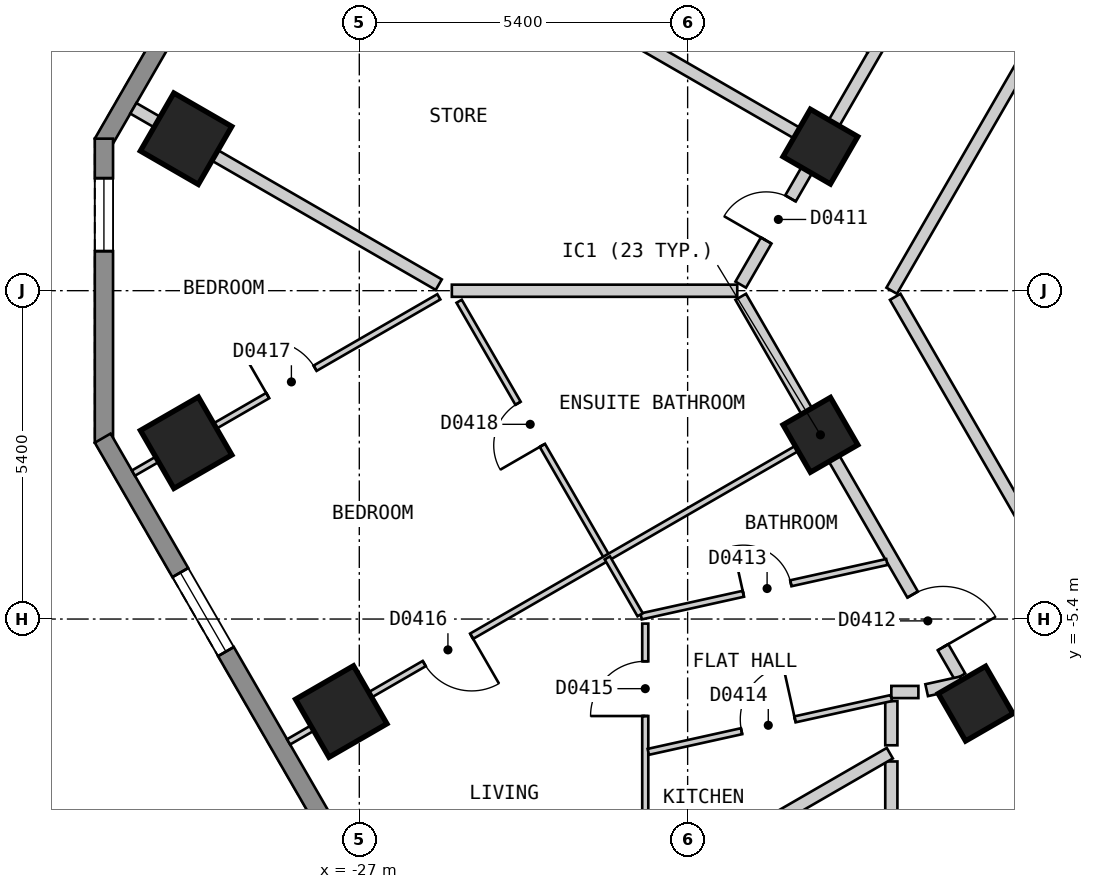
"""IFC4 building model, lengths in metres.
Left out: names, types, materials, properties, quantities, classifications, styles, units other than length and angle.
Written with IfcOpenShell. Run it as: python <this file> out.ifc"""

import sys

from ifc_helpers import new_model, si_unit, direction, frame, frame_2d, origin, origin_2d, place, context, subcontext, project, spatial, polyline, rectangle, outline, extrude, element, fill, save


model = new_model("IFC4")
c1 = context("Model", 3, precision=1e-05, world=origin(), true_north=direction((0.0, 1.0)))
c2 = subcontext(c1, "Body", "Model", "MODEL_VIEW")
j1 = project(units=[si_unit("LENGTHUNIT", "METRE"), si_unit("PLANEANGLEUNIT", "RADIAN")], contexts=[c1])
p1 = place(None, origin())
s1 = spatial("IfcSite", under=j1, at=p1, CompositionType="ELEMENT")
p2 = place(p1, origin())
s2 = spatial("IfcBuilding", under=s1, at=p2, CompositionType="ELEMENT")
p3 = place(p2, frame((0.0, 0.0, 32.4)))
s3 = spatial("IfcBuildingStorey", under=s2, at=p3, CompositionType="ELEMENT", Elevation=32.4)
for number, where, z_axis, x_axis in (
    (1, (-29.849, 2.499, 0.0), (0.0, 0.0, 1.0), (-0.5, -0.866, 0.0)),
    (2, (-29.848, -2.5, 0.0), (0.0, 0.0, 1.0), (0.5, -0.866, 0.0)),
    (3, (-27.297, -6.921, 0.0), (0.0, 0.0, 1.0), (0.5, -0.866, 0.0)),
):
    element("IfcColumn", number, at=place(p3, frame(where, z_axis=z_axis, x_axis=x_axis)), inside=s3, PredefinedType="COLUMN", context=c2, shape_type="SweptSolid", body=[
        extrude(rectangle(XDim=1.1, YDim=1.1, at=origin_2d()), origin(), (0.0, 0.0, 1.0), 3.0),
    ])
for number, where, z_axis, x_axis in (
    (4, (-19.416, -2.371, 0.0), (0.0, 0.0, 1.0), (0.5, -0.866, 0.0)),
    (5, (-16.864, -6.791, 0.0), (0.0, 0.0, 1.0), (0.5, -0.866, 0.0)),
    (6, (-19.417, 2.369, 0.0), (0.0, 0.0, 1.0), (-0.5, -0.866, 0.0)),
):
    element("IfcColumn", number, at=place(p3, frame(where, z_axis=z_axis, x_axis=x_axis)), inside=s3, PredefinedType="COLUMN", context=c2, shape_type="SweptSolid", body=[
        extrude(rectangle(XDim=0.9, YDim=0.9, at=origin_2d()), origin(), (0.0, 0.0, 1.0), 3.0),
    ])
p4 = place(p3, frame((-17.71, 25.825, 0.0), z_axis=(0.0, 0.0, 1.0), x_axis=(-0.500001938803, -0.866024284413, 0.0)))
e7 = element("IfcWall", 7, at=p4, inside=s3, PredefinedType="SOLIDWALL", context=c2, shape_type="SweptSolid", body=[
    extrude(outline(polyline([(0.0, -0.15), (27.02, -0.15), (26.94, 0.15), (0.08, 0.15), (0.0, -0.15)])), origin(), (0.0, 0.0, 1.0), 2.7),
])
p5 = place(p4, frame((2.553, 0.0, 0.15)))
e8 = element("IfcOpeningElement", 8, at=p5, cuts=e7, PredefinedType="OPENING", context=c2, shape_type="SweptSolid", body=[
    extrude(rectangle(XDim=1.5, YDim=2.1, at=frame_2d((0.75, 1.05))), frame((0.0, 0.16, 0.0), z_axis=(0.0, -1.0, 0.0), x_axis=(1.0, 0.0, 0.0)), (0.0, 0.0, 1.0), 0.32),
])
p6 = place(p4, frame((7.658, 0.0, 0.15)))
e9 = element("IfcOpeningElement", 9, at=p6, cuts=e7, PredefinedType="OPENING", context=c2, shape_type="SweptSolid", body=[
    extrude(rectangle(XDim=1.5, YDim=2.1, at=frame_2d((0.75, 1.05))), frame((0.0, 0.16, 0.0), z_axis=(0.0, -1.0, 0.0), x_axis=(1.0, 0.0, 0.0)), (0.0, 0.0, 1.0), 0.32),
])
p7 = place(p4, frame((12.761, 0.0, 0.15)))
e10 = element("IfcOpeningElement", 10, at=p7, cuts=e7, PredefinedType="OPENING", context=c2, shape_type="SweptSolid", body=[
    extrude(rectangle(XDim=1.5, YDim=2.1, at=frame_2d((0.75, 1.05))), frame((0.0, 0.16, 0.0), z_axis=(0.0, -1.0, 0.0), x_axis=(1.0, 0.0, 0.0)), (0.0, 0.0, 1.0), 0.32),
])
p8 = place(p4, frame((17.865, 0.0, 0.15)))
e11 = element("IfcOpeningElement", 11, at=p8, cuts=e7, PredefinedType="OPENING", context=c2, shape_type="SweptSolid", body=[
    extrude(rectangle(XDim=1.5, YDim=2.1, at=frame_2d((0.75, 1.05))), frame((0.0, 0.16, 0.0), z_axis=(0.0, -1.0, 0.0), x_axis=(1.0, 0.0, 0.0)), (0.0, 0.0, 1.0), 0.32),
])
p9 = place(p4, frame((22.969, 0.0, 0.15)))
e12 = element("IfcOpeningElement", 12, at=p9, cuts=e7, PredefinedType="OPENING", context=c2, shape_type="SweptSolid", body=[
    extrude(rectangle(XDim=1.5, YDim=2.1, at=frame_2d((0.75, 1.05))), frame((0.0, 0.16, 0.0), z_axis=(0.0, -1.0, 0.0), x_axis=(1.0, 0.0, 0.0)), (0.0, 0.0, 1.0), 0.32),
])
p10 = place(p3, frame((-31.2, 2.5, 0.0), z_axis=(0.0, 0.0, 1.0), x_axis=(0.0, -1.0, 0.0)))
e13 = element("IfcWall", 13, at=p10, inside=s3, PredefinedType="SOLIDWALL", context=c2, shape_type="SweptSolid", body=[
    extrude(outline(polyline([(0.0, -0.15), (5.0, -0.15), (4.92, 0.15), (0.08, 0.15), (0.0, -0.15)])), origin(), (0.0, 0.0, 1.0), 2.7),
])
p11 = place(p10, frame((0.65, 0.0, 0.15)))
e14 = element("IfcOpeningElement", 14, at=p11, cuts=e13, PredefinedType="OPENING", context=c2, shape_type="SweptSolid", body=[
    extrude(rectangle(XDim=1.2, YDim=2.1, at=frame_2d((0.6, 1.05))), frame((0.0, 0.16, 0.0), z_axis=(0.0, -1.0, 0.0), x_axis=(1.0, 0.0, 0.0)), (0.0, 0.0, 1.0), 0.32),
])
p12 = place(p3, frame((-31.22, -2.425, 0.0), z_axis=(0.0, 0.0, 1.0), x_axis=(0.500001938803, -0.866024284413, 0.0)))
e15 = element("IfcWall", 15, at=p12, inside=s3, PredefinedType="SOLIDWALL", context=c2, shape_type="SweptSolid", body=[
    extrude(outline(polyline([(0.0, -0.15), (27.02, -0.15), (26.94, 0.15), (0.08, 0.15), (0.0, -0.15)])), origin(), (0.0, 0.0, 1.0), 2.7),
])
p13 = place(p12, frame((2.553, 0.0, 0.15)))
e16 = element("IfcOpeningElement", 16, at=p13, cuts=e15, PredefinedType="OPENING", context=c2, shape_type="SweptSolid", body=[
    extrude(rectangle(XDim=1.5, YDim=2.1, at=frame_2d((0.75, 1.05))), frame((0.0, 0.16, 0.0), z_axis=(0.0, -1.0, 0.0), x_axis=(1.0, 0.0, 0.0)), (0.0, 0.0, 1.0), 0.32),
])
p14 = place(p12, frame((7.657, 0.0, 0.15)))
e17 = element("IfcOpeningElement", 17, at=p14, cuts=e15, PredefinedType="OPENING", context=c2, shape_type="SweptSolid", body=[
    extrude(rectangle(XDim=1.5, YDim=2.1, at=frame_2d((0.75, 1.05))), frame((0.0, 0.16, 0.0), z_axis=(0.0, -1.0, 0.0), x_axis=(1.0, 0.0, 0.0)), (0.0, 0.0, 1.0), 0.32),
])
p15 = place(p12, frame((12.761, 0.0, 0.15)))
e18 = element("IfcOpeningElement", 18, at=p15, cuts=e15, PredefinedType="OPENING", context=c2, shape_type="SweptSolid", body=[
    extrude(rectangle(XDim=1.5, YDim=2.1, at=frame_2d((0.75, 1.05))), frame((0.0, 0.16, 0.0), z_axis=(0.0, -1.0, 0.0), x_axis=(1.0, 0.0, 0.0)), (0.0, 0.0, 1.0), 0.32),
])
p16 = place(p12, frame((17.865, 0.0, 0.15)))
e19 = element("IfcOpeningElement", 19, at=p16, cuts=e15, PredefinedType="OPENING", context=c2, shape_type="SweptSolid", body=[
    extrude(rectangle(XDim=1.5, YDim=2.1, at=frame_2d((0.75, 1.05))), frame((0.0, 0.16, 0.0), z_axis=(0.0, -1.0, 0.0), x_axis=(1.0, 0.0, 0.0)), (0.0, 0.0, 1.0), 0.32),
])
p17 = place(p12, frame((22.969, 0.0, 0.15)))
e20 = element("IfcOpeningElement", 20, at=p17, cuts=e15, PredefinedType="OPENING", context=c2, shape_type="SweptSolid", body=[
    extrude(rectangle(XDim=1.5, YDim=2.1, at=frame_2d((0.75, 1.05))), frame((0.0, 0.16, 0.0), z_axis=(0.0, -1.0, 0.0), x_axis=(1.0, 0.0, 0.0)), (0.0, 0.0, 1.0), 0.32),
])
p18 = place(p3, frame((-18.186, -0.101, 0.0), z_axis=(0.0, 0.0, 1.0), x_axis=(0.499997591167, -0.86602679452, 0.0)))
e21 = element("IfcWall", 21, at=p18, inside=s3, PredefinedType="PARTITIONING", context=c2, shape_type="SweptSolid", body=[
    extrude(rectangle(XDim=5.172, YDim=0.2, at=frame_2d((2.586, 0.0))), origin(), (0.0, 0.0, 1.0), 2.7),
])
p19 = place(p3, frame((-20.727, -0.101, 0.0), z_axis=(0.0, 0.0, 1.0), x_axis=(0.500049702773, -0.865996705973, 0.0)))
e22 = element("IfcWall", 22, at=p19, inside=s3, PredefinedType="PARTITIONING", context=c2, shape_type="SweptSolid", body=[
    extrude(rectangle(XDim=7.211, YDim=0.2, at=frame_2d((3.605, 0.0))), origin(), (0.0, 0.0, 1.0), 2.7),
])
p20 = place(p19, frame((5.654, 0.0, 0.0)))
e23 = element("IfcOpeningElement", 23, at=p20, cuts=e22, PredefinedType="OPENING", context=c2, shape_type="SweptSolid", body=[
    extrude(rectangle(XDim=1.0, YDim=2.1, at=frame_2d((0.5, 1.05))), frame((0.0, 0.11, 0.0), z_axis=(0.0, -1.0, 0.0), x_axis=(1.0, 0.0, 0.0)), (0.0, 0.0, 1.0), 0.22),
])
p21 = place(p3, frame((-18.25, -6.6, 0.0), z_axis=(0.0, 0.0, 1.0), x_axis=(1.0, 0.0, 0.0)))
e24 = element("IfcWall", 24, at=p21, inside=s3, PredefinedType="PARTITIONING", context=c2, shape_type="SweptSolid", body=[
    extrude(rectangle(XDim=0.445, YDim=0.2, at=frame_2d((0.223, 0.0))), origin(), (0.0, 0.0, 1.0), 2.7),
])
p22 = place(p3, frame((-18.244, -0.001, 0.0), z_axis=(0.0, 0.0, 1.0), x_axis=(0.499962999376, 0.866046765051, 0.0)))
e25 = element("IfcWall", 25, at=p22, inside=s3, PredefinedType="PARTITIONING", context=c2, shape_type="SweptSolid", body=[
    extrude(rectangle(XDim=18.245, YDim=0.2, at=frame_2d((9.123, 0.0))), origin(), (0.0, 0.0, 1.0), 2.7),
])
p23 = place(p22, frame((8.672, 0.0, 0.0)))
e26 = element("IfcOpeningElement", 26, at=p23, cuts=e25, PredefinedType="OPENING", context=c2, shape_type="SweptSolid", body=[
    extrude(rectangle(XDim=0.9, YDim=2.1, at=frame_2d((0.45, 1.05))), frame((0.0, 0.11, 0.0), z_axis=(0.0, -1.0, 0.0), x_axis=(1.0, 0.0, 0.0)), (0.0, 0.0, 1.0), 0.22),
])
p24 = place(p3, frame((-20.727, 0.099, 0.0), z_axis=(0.0, 0.0, 1.0), x_axis=(0.499993204491, 0.866029327138, 0.0)))
e27 = element("IfcWall", 27, at=p24, inside=s3, PredefinedType="PARTITIONING", context=c2, shape_type="SweptSolid", body=[
    extrude(rectangle(XDim=20.554, YDim=0.2, at=frame_2d((10.277, 0.0))), origin(), (0.0, 0.0, 1.0), 2.7),
])
p25 = place(p24, frame((18.916, 0.0, 0.0)))
e28 = element("IfcOpeningElement", 28, at=p25, cuts=e27, PredefinedType="OPENING", context=c2, shape_type="SweptSolid", body=[
    extrude(rectangle(XDim=0.8, YDim=2.1, at=frame_2d((0.4, 1.05))), frame((0.0, 0.11, 0.0), z_axis=(0.0, -1.0, 0.0), x_axis=(1.0, 0.0, 0.0)), (0.0, 0.0, 1.0), 0.22),
])
p26 = place(p24, frame((14.88, 0.0, 0.0)))
e29 = element("IfcOpeningElement", 29, at=p26, cuts=e27, PredefinedType="OPENING", context=c2, shape_type="SweptSolid", body=[
    extrude(rectangle(XDim=1.0, YDim=2.1, at=frame_2d((0.5, 1.05))), frame((0.0, 0.11, 0.0), z_axis=(0.0, -1.0, 0.0), x_axis=(1.0, 0.0, 0.0)), (0.0, 0.0, 1.0), 0.22),
])
p27 = place(p24, frame((9.776, 0.0, 0.0)))
e30 = element("IfcOpeningElement", 30, at=p27, cuts=e27, PredefinedType="OPENING", context=c2, shape_type="SweptSolid", body=[
    extrude(rectangle(XDim=1.0, YDim=2.1, at=frame_2d((0.5, 1.05))), frame((0.0, 0.11, 0.0), z_axis=(0.0, -1.0, 0.0), x_axis=(1.0, 0.0, 0.0)), (0.0, 0.0, 1.0), 0.22),
])
p28 = place(p24, frame((4.673, 0.0, 0.0)))
e31 = element("IfcOpeningElement", 31, at=p28, cuts=e27, PredefinedType="OPENING", context=c2, shape_type="SweptSolid", body=[
    extrude(rectangle(XDim=1.0, YDim=2.1, at=frame_2d((0.5, 1.05))), frame((0.0, 0.11, 0.0), z_axis=(0.0, -1.0, 0.0), x_axis=(1.0, 0.0, 0.0)), (0.0, 0.0, 1.0), 0.22),
])
p29 = place(p24, frame((0.838, 0.0, 0.0)))
e32 = element("IfcOpeningElement", 32, at=p29, cuts=e27, PredefinedType="OPENING", context=c2, shape_type="SweptSolid", body=[
    extrude(rectangle(XDim=0.8, YDim=2.1, at=frame_2d((0.4, 1.05))), frame((0.0, 0.11, 0.0), z_axis=(0.0, -1.0, 0.0), x_axis=(1.0, 0.0, 0.0)), (0.0, 0.0, 1.0), 0.22),
])
p30 = place(p3, frame((-18.25, -11.407, 0.0), z_axis=(0.0, 0.0, 1.0), x_axis=(0.0, 1.0, 0.0)))
e33 = element("IfcWall", 33, at=p30, inside=s3, PredefinedType="PARTITIONING", context=c2, shape_type="SweptSolid", body=[
    extrude(rectangle(XDim=3.665, YDim=0.2, at=frame_2d((1.833, 0.0))), origin(), (0.0, 0.0, 1.0), 2.7),
])
p31 = place(p30, frame((0.334, 0.0, 0.0)))
e34 = element("IfcOpeningElement", 34, at=p31, cuts=e33, PredefinedType="OPENING", context=c2, shape_type="SweptSolid", body=[
    extrude(rectangle(XDim=1.0, YDim=2.1, at=frame_2d((0.5, 1.05))), frame((0.0, 0.11, 0.0), z_axis=(0.0, -1.0, 0.0), x_axis=(1.0, 0.0, 0.0)), (0.0, 0.0, 1.0), 0.22),
])
p32 = place(p3, frame((-18.25, -7.476, 0.0), z_axis=(0.0, 0.0, 1.0), x_axis=(0.0, 1.0, 0.0)))
e35 = element("IfcWall", 35, at=p32, inside=s3, PredefinedType="PARTITIONING", context=c2, shape_type="SweptSolid", body=[
    extrude(rectangle(XDim=0.726, YDim=0.2, at=frame_2d((0.363, 0.0))), origin(), (0.0, 0.0, 1.0), 2.7),
])
p33 = place(p3, frame((-25.358, -0.174, 0.0), z_axis=(0.0, 0.0, 1.0), x_axis=(0.500093956194, -0.865971151354, 0.0)))
e36 = element("IfcWall", 36, at=p33, inside=s3, PredefinedType="PARTITIONING", context=c2, shape_type="SweptSolid", body=[
    extrude(rectangle(XDim=4.873, YDim=0.1, at=frame_2d((2.437, 0.0))), origin(), (0.0, 0.0, 1.0), 2.7),
])
p34 = place(p33, frame((1.937, 0.0, 0.0)))
e37 = element("IfcOpeningElement", 37, at=p34, cuts=e36, PredefinedType="OPENING", context=c2, shape_type="SweptSolid", body=[
    extrude(rectangle(XDim=0.8, YDim=2.1, at=frame_2d((0.4, 1.05))), frame((0.0, 0.06, 0.0), z_axis=(0.0, -1.0, 0.0), x_axis=(1.0, 0.0, 0.0)), (0.0, 0.0, 1.0), 0.12),
])
p35 = place(p3, frame((-22.297, -9.813, 0.0), z_axis=(0.0, 0.0, 1.0), x_axis=(0.0, 1.0, 0.0)))
e38 = element("IfcWall", 38, at=p35, inside=s3, PredefinedType="PARTITIONING", context=c2, shape_type="SweptSolid", body=[
    extrude(rectangle(XDim=4.338, YDim=0.1, at=frame_2d((2.169, 0.0))), origin(), (0.0, 0.0, 1.0), 2.7),
])
p36 = place(p35, frame((2.818, 0.0, 0.0)))
e39 = element("IfcOpeningElement", 39, at=p36, cuts=e38, PredefinedType="OPENING", context=c2, shape_type="SweptSolid", body=[
    extrude(rectangle(XDim=0.9, YDim=2.1, at=frame_2d((0.45, 1.05))), frame((0.0, 0.06, 0.0), z_axis=(0.0, -1.0, 0.0), x_axis=(1.0, 0.0, 0.0)), (0.0, 0.0, 1.0), 0.12),
])
p37 = place(p3, frame((-22.365, -5.357, 0.0), z_axis=(0.0, 0.0, 1.0), x_axis=(0.976339488582, 0.216243388421, 0.0)))
e40 = element("IfcWall", 40, at=p37, inside=s3, PredefinedType="PARTITIONING", context=c2, shape_type="SweptSolid", body=[
    extrude(rectangle(XDim=4.139, YDim=0.1, at=frame_2d((2.069, 0.0))), origin(), (0.0, 0.0, 1.0), 2.7),
])
p38 = place(p37, frame((1.722, 0.0, 0.0)))
e41 = element("IfcOpeningElement", 41, at=p38, cuts=e40, PredefinedType="OPENING", context=c2, shape_type="SweptSolid", body=[
    extrude(rectangle(XDim=0.8, YDim=2.1, at=frame_2d((0.4, 1.05))), frame((0.0, 0.06, 0.0), z_axis=(0.0, -1.0, 0.0), x_axis=(1.0, 0.0, 0.0)), (0.0, 0.0, 1.0), 0.12),
])
p39 = place(p3, frame((-22.247, -7.584, 0.0), z_axis=(0.0, 0.0, 1.0), x_axis=(0.97635375062, 0.216178985219, 0.0)))
e42 = element("IfcWall", 42, at=p39, inside=s3, PredefinedType="PARTITIONING", context=c2, shape_type="SweptSolid", body=[
    extrude(rectangle(XDim=4.094, YDim=0.1, at=frame_2d((2.047, 0.0))), origin(), (0.0, 0.0, 1.0), 2.7),
])
p40 = place(p39, frame((1.571, 0.0, 0.0)))
e43 = element("IfcOpeningElement", 43, at=p40, cuts=e42, PredefinedType="OPENING", context=c2, shape_type="SweptSolid", body=[
    extrude(rectangle(XDim=0.9, YDim=2.1, at=frame_2d((0.45, 1.05))), frame((0.0, 0.06, 0.0), z_axis=(0.0, -1.0, 0.0), x_axis=(1.0, 0.0, 0.0)), (0.0, 0.0, 1.0), 0.12),
])
p41 = place(p3, frame((-28.163, -7.42, 0.0), z_axis=(0.0, 0.0, 1.0), x_axis=(0.866065245018, 0.499930986609, 0.0)))
e44 = element("IfcWall", 44, at=p41, inside=s3, PredefinedType="PARTITIONING", context=c2, shape_type="SweptSolid", body=[
    extrude(rectangle(XDim=10.0, YDim=0.1, at=frame_2d((5.0, 0.0))), origin(), (0.0, 0.0, 1.0), 2.7),
])
p42 = place(p41, frame((2.576, 0.0, 0.0)))
e45 = element("IfcOpeningElement", 45, at=p42, cuts=e44, PredefinedType="OPENING", context=c2, shape_type="SweptSolid", body=[
    extrude(rectangle(XDim=0.9, YDim=2.1, at=frame_2d((0.45, 1.05))), frame((0.0, 0.06, 0.0), z_axis=(0.0, -1.0, 0.0), x_axis=(1.0, 0.0, 0.0)), (0.0, 0.0, 1.0), 0.12),
])
p43 = place(p3, frame((-30.715, -3.0, 0.0), z_axis=(0.0, 0.0, 1.0), x_axis=(0.866116197112, 0.49984270836, 0.0)))
e46 = element("IfcWall", 46, at=p43, inside=s3, PredefinedType="PARTITIONING", context=c2, shape_type="SweptSolid", body=[
    extrude(rectangle(XDim=5.8, YDim=0.1, at=frame_2d((2.9, 0.0))), origin(), (0.0, 0.0, 1.0), 2.7),
])
p44 = place(p43, frame((2.55, 0.0, 0.0)))
e47 = element("IfcOpeningElement", 47, at=p44, cuts=e46, PredefinedType="OPENING", context=c2, shape_type="SweptSolid", body=[
    extrude(rectangle(XDim=0.9, YDim=2.1, at=frame_2d((0.45, 1.05))), frame((0.0, 0.06, 0.0), z_axis=(0.0, -1.0, 0.0), x_axis=(1.0, 0.0, 0.0)), (0.0, 0.0, 1.0), 0.12),
])
p45 = place(p3, frame((-28.163, 7.419, 0.0), z_axis=(0.0, 0.0, 1.0), x_axis=(0.866022959057, -0.500004234368, 0.0)))
e48 = element("IfcWall", 48, at=p45, inside=s3, PredefinedType="PARTITIONING", context=c2, shape_type="SweptSolid", body=[
    extrude(rectangle(XDim=10.0, YDim=0.2, at=frame_2d((5.0, 0.0))), origin(), (0.0, 0.0, 1.0), 2.7),
])
p46 = place(p3, frame((-30.716, 2.999, 0.0), z_axis=(0.0, 0.0, 1.0), x_axis=(0.866032775405, -0.499987231761, 0.0)))
e49 = element("IfcWall", 49, at=p46, inside=s3, PredefinedType="PARTITIONING", context=c2, shape_type="SweptSolid", body=[
    extrude(rectangle(XDim=5.8, YDim=0.2, at=frame_2d((2.9, 0.0))), origin(), (0.0, 0.0, 1.0), 2.7),
])
p47 = place(p3, frame((-25.478, -0.001, 0.0), z_axis=(0.0, 0.0, 1.0), x_axis=(1.0, 0.0, 0.0)))
e50 = element("IfcWall", 50, at=p47, inside=s3, PredefinedType="PARTITIONING", context=c2, shape_type="SweptSolid", body=[
    extrude(rectangle(XDim=4.694, YDim=0.2, at=frame_2d((2.347, 0.0))), origin(), (0.0, 0.0, 1.0), 2.7),
])
p48 = place(p3, frame((-17.669, -6.57, 0.0), z_axis=(0.0, 0.0, 1.0), x_axis=(0.976422724526, 0.215867234728, 0.0)))
e51 = element("IfcWall", 51, at=p48, inside=s3, PredefinedType="PARTITIONING", context=c2, shape_type="SweptSolid", body=[
    extrude(rectangle(XDim=0.583, YDim=0.2, at=frame_2d((0.292, 0.0))), origin(), (0.0, 0.0, 1.0), 2.7),
])
p49 = place(p3, frame((-25.61, -11.841, 0.0), z_axis=(0.0, 0.0, 1.0), x_axis=(0.866019023803, 0.500011050288, 0.0)))
e52 = element("IfcWall", 52, at=p49, inside=s3, PredefinedType="PARTITIONING", context=c2, shape_type="SweptSolid", body=[
    extrude(rectangle(XDim=8.47, YDim=0.2, at=frame_2d((4.235, 0.0))), origin(), (0.0, 0.0, 1.0), 2.7),
])
p50 = place(p3, frame((-22.921, -4.394, 0.0), z_axis=(0.0, 0.0, 1.0), x_axis=(0.499565963512, -0.866275849889, 0.0)))
e53 = element("IfcWall", 53, at=p50, inside=s3, PredefinedType="PARTITIONING", context=c2, shape_type="SweptSolid", body=[
    extrude(rectangle(XDim=1.081, YDim=0.1, at=frame_2d((0.54, 0.0))), origin(), (0.0, 0.0, 1.0), 2.7),
])
p51 = place(p11, origin())
e54 = element("IfcWindow", 54, at=p51, inside=s3, PartitioningType="SINGLE_PANEL", PredefinedType="WINDOW", context=c2, shape_type="SweptSolid", body=[
    extrude(rectangle(XDim=1.2, YDim=2.1, at=frame_2d((0.6, 1.05))), frame((0.0, 0.03, 0.0), z_axis=(0.0, -1.0, 0.0), x_axis=(1.0, 0.0, 0.0)), (0.0, 0.0, 1.0), 0.06),
])
fill(e14, e54)
p52 = place(p13, origin())
e55 = element("IfcWindow", 55, at=p52, inside=s3, PartitioningType="SINGLE_PANEL", PredefinedType="WINDOW", context=c2, shape_type="SweptSolid", body=[
    extrude(rectangle(XDim=1.5, YDim=2.1, at=frame_2d((0.75, 1.05))), frame((0.0, 0.03, 0.0), z_axis=(0.0, -1.0, 0.0), x_axis=(1.0, 0.0, 0.0)), (0.0, 0.0, 1.0), 0.06),
])
fill(e16, e55)
p53 = place(p29, origin())
e56 = element("IfcDoor", 56, at=p53, inside=s3, OperationType="SINGLE_SWING_LEFT", PredefinedType="DOOR", context=c2, shape_type="SweptSolid", body=[
    extrude(rectangle(XDim=0.8, YDim=2.1, at=frame_2d((0.4, 1.05))), frame((0.0, 0.025, 0.0), z_axis=(0.0, -1.0, 0.0), x_axis=(1.0, 0.0, 0.0)), (0.0, 0.0, 1.0), 0.05),
])
fill(e32, e56)
p54 = place(p20, origin())
e57 = element("IfcDoor", 57, at=p54, inside=s3, OperationType="SINGLE_SWING_RIGHT", PredefinedType="DOOR", context=c2, shape_type="SweptSolid", body=[
    extrude(rectangle(XDim=1.0, YDim=2.1, at=frame_2d((0.5, 1.05))), frame((0.0, 0.025, 0.0), z_axis=(0.0, -1.0, 0.0), x_axis=(1.0, 0.0, 0.0)), (0.0, 0.0, 1.0), 0.05),
])
fill(e23, e57)
p55 = place(p38, origin())
e58 = element("IfcDoor", 58, at=p55, inside=s3, OperationType="SINGLE_SWING_LEFT", PredefinedType="DOOR", context=c2, shape_type="SweptSolid", body=[
    extrude(rectangle(XDim=0.8, YDim=2.1, at=frame_2d((0.4, 1.05))), frame((0.0, 0.025, 0.0), z_axis=(0.0, -1.0, 0.0), x_axis=(1.0, 0.0, 0.0)), (0.0, 0.0, 1.0), 0.05),
])
fill(e41, e58)
p56 = place(p40, origin())
e59 = element("IfcDoor", 59, at=p56, inside=s3, OperationType="SINGLE_SWING_RIGHT", PredefinedType="DOOR", context=c2, shape_type="SweptSolid", body=[
    extrude(rectangle(XDim=0.9, YDim=2.1, at=frame_2d((0.45, 1.05))), frame((0.0, 0.025, 0.0), z_axis=(0.0, -1.0, 0.0), x_axis=(1.0, 0.0, 0.0)), (0.0, 0.0, 1.0), 0.05),
])
fill(e43, e59)
p57 = place(p36, origin())
e60 = element("IfcDoor", 60, at=p57, inside=s3, OperationType="SINGLE_SWING_LEFT", PredefinedType="DOOR", context=c2, shape_type="SweptSolid", body=[
    extrude(rectangle(XDim=0.9, YDim=2.1, at=frame_2d((0.45, 1.05))), frame((0.0, 0.025, 0.0), z_axis=(0.0, -1.0, 0.0), x_axis=(1.0, 0.0, 0.0)), (0.0, 0.0, 1.0), 0.05),
])
fill(e39, e60)
p58 = place(p42, origin())
e61 = element("IfcDoor", 61, at=p58, inside=s3, OperationType="SINGLE_SWING_RIGHT", PredefinedType="DOOR", context=c2, shape_type="SweptSolid", body=[
    extrude(rectangle(XDim=0.9, YDim=2.1, at=frame_2d((0.45, 1.05))), frame((0.0, 0.025, 0.0), z_axis=(0.0, -1.0, 0.0), x_axis=(1.0, 0.0, 0.0)), (0.0, 0.0, 1.0), 0.05),
])
fill(e45, e61)
p59 = place(p44, origin())
e62 = element("IfcDoor", 62, at=p59, inside=s3, OperationType="SINGLE_SWING_LEFT", PredefinedType="DOOR", context=c2, shape_type="SweptSolid", body=[
    extrude(rectangle(XDim=0.9, YDim=2.1, at=frame_2d((0.45, 1.05))), frame((0.0, 0.025, 0.0), z_axis=(0.0, -1.0, 0.0), x_axis=(1.0, 0.0, 0.0)), (0.0, 0.0, 1.0), 0.05),
])
fill(e47, e62)
p60 = place(p34, origin())
e63 = element("IfcDoor", 63, at=p60, inside=s3, OperationType="SINGLE_SWING_RIGHT", PredefinedType="DOOR", context=c2, shape_type="SweptSolid", body=[
    extrude(rectangle(XDim=0.8, YDim=2.1, at=frame_2d((0.4, 1.05))), frame((0.0, 0.025, 0.0), z_axis=(0.0, -1.0, 0.0), x_axis=(1.0, 0.0, 0.0)), (0.0, 0.0, 1.0), 0.05),
])
fill(e37, e63)
save(model, sys.argv[1])
